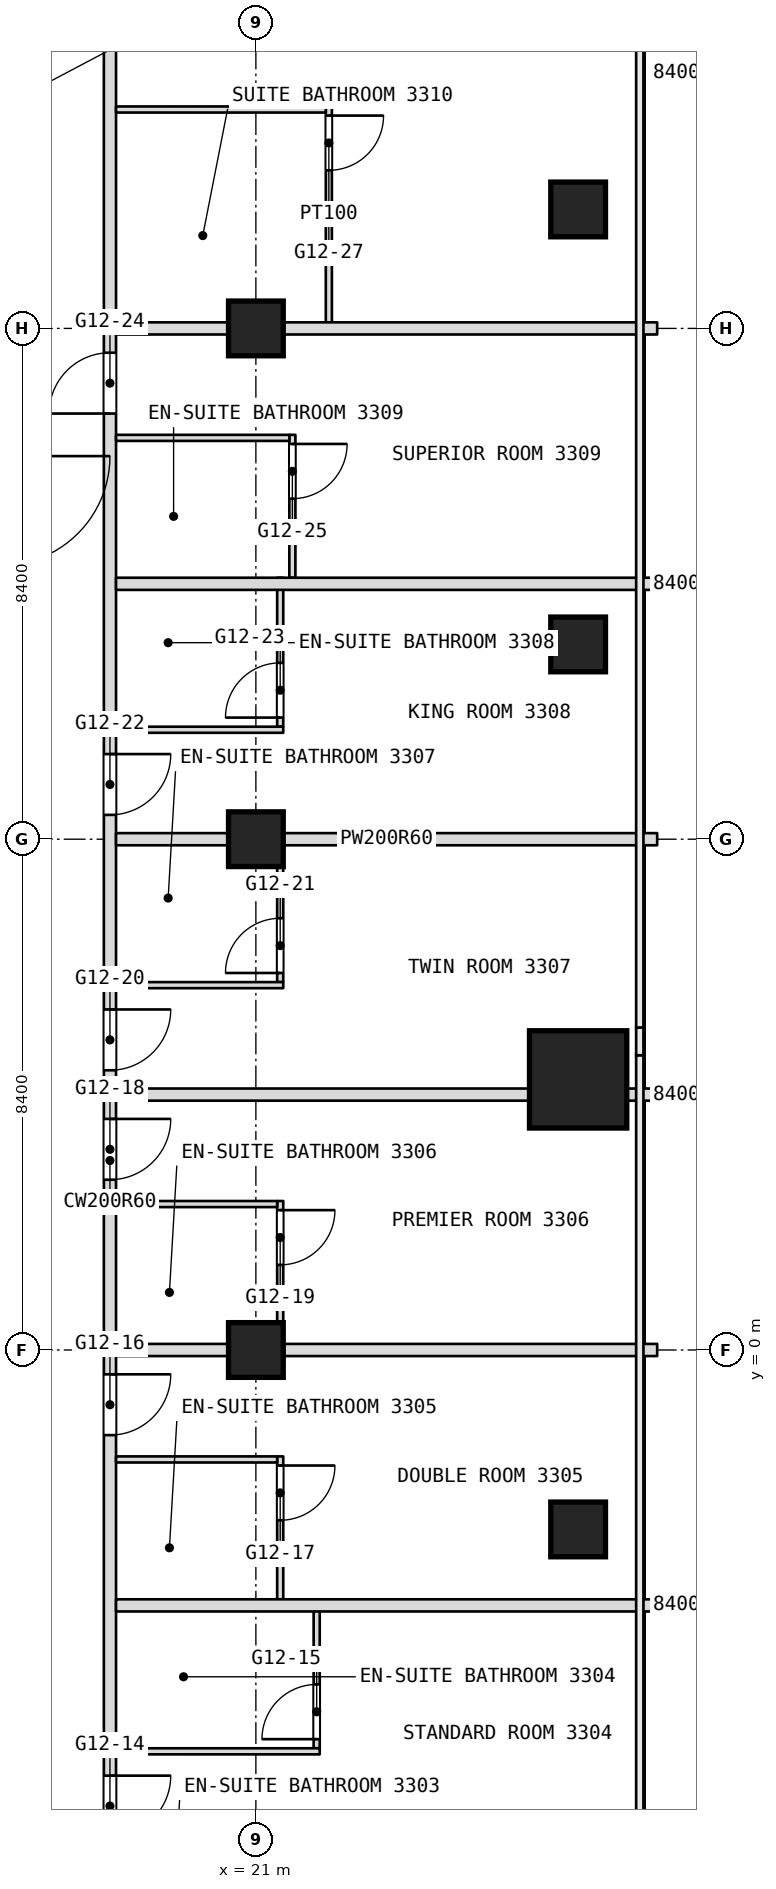
"""IFC4 building model, lengths in metres.
Left out: names, types, materials, properties, quantities, classifications, styles, units other than length and angle.
Written with IfcOpenShell. Run it as: python <this file> out.ifc"""

import sys

from ifc_helpers import new_model, si_unit, direction, frame, frame_2d, origin, origin_2d, place, context, subcontext, project, spatial, rectangle, extrude, element, fill, save


model = new_model("IFC4")
c1 = context("Model", 3, precision=1e-05, world=origin(), true_north=direction((0.0, 1.0)))
c2 = subcontext(c1, "Body", "Model", "MODEL_VIEW")
j1 = project(units=[si_unit("LENGTHUNIT", "METRE"), si_unit("PLANEANGLEUNIT", "RADIAN")], contexts=[c1])
p1 = place(None, origin())
s1 = spatial("IfcSite", under=j1, at=p1, CompositionType="ELEMENT")
p2 = place(p1, origin())
s2 = spatial("IfcBuilding", under=s1, at=p2, CompositionType="ELEMENT")
p3 = place(p2, frame((0.0, 0.0, 144.5)))
s3 = spatial("IfcBuildingStorey", under=s2, at=p3, CompositionType="ELEMENT", Elevation=144.5)
p4 = place(p3, frame((26.3, 4.45, 0.0), z_axis=(0.0, 0.0, 1.0), x_axis=(1.0, 0.0, 0.0)))
e1 = element("IfcColumn", 1, at=p4, inside=s3, PredefinedType="COLUMN", context=c2, shape_type="SweptSolid", body=[
    extrude(rectangle(XDim=1.6, YDim=1.6, at=origin_2d()), origin(), (0.0, 0.0, 1.0), 3.6),
])
for number, where, z_axis, x_axis in (
    (2, (21.0, 0.0, 0.0), (0.0, 0.0, 1.0), (1.0, 0.0, 0.0)),
    (3, (21.0, 8.4, 0.0), (0.0, 0.0, 1.0), (1.0, 0.0, 0.0)),
    (4, (21.0, 16.8, 0.0), (0.0, 0.0, 1.0), (1.0, 0.0, 0.0)),
    (5, (26.3, 18.756, 0.0), (0.0, 0.0, 1.0), (1.0, 0.0, 0.0)),
    (6, (26.3, 11.603, 0.0), (0.0, 0.0, 1.0), (1.0, 0.0, 0.0)),
    (7, (26.3, -2.951, 0.0), (0.0, 0.0, 1.0), (1.0, 0.0, 0.0)),
):
    element("IfcColumn", number, at=place(p3, frame(where, z_axis=z_axis, x_axis=x_axis)), inside=s3, PredefinedType="COLUMN", context=c2, shape_type="SweptSolid", body=[
        extrude(rectangle(XDim=0.9, YDim=0.9, at=origin_2d()), origin(), (0.0, 0.0, 1.0), 3.6),
    ])
p5 = place(p3, frame((22.2, 16.9, 0.0), z_axis=(0.0, 0.0, 1.0), x_axis=(0.0, 1.0, 0.0)))
e8 = element("IfcWall", 8, at=p5, inside=s3, PredefinedType="PARTITIONING", context=c2, shape_type="SweptSolid", body=[
    extrude(rectangle(XDim=3.55, YDim=0.1, at=frame_2d((1.775, 0.0))), origin(), (0.0, 0.0, 1.0), 3.34),
])
p6 = place(p5, frame((2.5, 0.0, 0.0)))
e9 = element("IfcOpeningElement", 9, at=p6, cuts=e8, PredefinedType="OPENING", context=c2, shape_type="SweptSolid", body=[
    extrude(rectangle(XDim=0.9, YDim=2.1, at=frame_2d((0.45, 1.05))), frame((0.0, 0.05, 0.0), z_axis=(0.0, -1.0, 0.0), x_axis=(1.0, 0.0, 0.0)), (0.0, 0.0, 1.0), 0.1),
])
p7 = place(p3, frame((22.0, -6.55, 0.0), z_axis=(0.0, 0.0, 1.0), x_axis=(0.0, 1.0, 0.0)))
e10 = element("IfcWall", 10, at=p7, inside=s3, PredefinedType="PARTITIONING", context=c2, shape_type="SweptSolid", body=[
    extrude(rectangle(XDim=2.45, YDim=0.1, at=frame_2d((1.225, 0.0))), origin(), (0.0, 0.0, 1.0), 3.34),
])
p8 = place(p7, frame((0.15, 0.0, 0.0)))
e11 = element("IfcOpeningElement", 11, at=p8, cuts=e10, PredefinedType="OPENING", context=c2, shape_type="SweptSolid", body=[
    extrude(rectangle(XDim=0.9, YDim=2.1, at=frame_2d((0.45, 1.05))), frame((0.0, 0.05, 0.0), z_axis=(0.0, -1.0, 0.0), x_axis=(1.0, 0.0, 0.0)), (0.0, 0.0, 1.0), 0.1),
])
p9 = place(p3, frame((21.6, 12.7, 0.0), z_axis=(0.0, 0.0, 1.0), x_axis=(0.0, 1.0, 0.0)))
e12 = element("IfcWall", 12, at=p9, inside=s3, PredefinedType="PARTITIONING", context=c2, shape_type="SweptSolid", body=[
    extrude(rectangle(XDim=2.35, YDim=0.1, at=frame_2d((1.175, 0.0))), origin(), (0.0, 0.0, 1.0), 3.34),
])
p10 = place(p9, frame((1.3, 0.0, 0.0)))
e13 = element("IfcOpeningElement", 13, at=p10, cuts=e12, PredefinedType="OPENING", context=c2, shape_type="SweptSolid", body=[
    extrude(rectangle(XDim=0.9, YDim=2.1, at=frame_2d((0.45, 1.05))), frame((0.0, 0.05, 0.0), z_axis=(0.0, -1.0, 0.0), x_axis=(1.0, 0.0, 0.0)), (0.0, 0.0, 1.0), 0.1),
])
p11 = place(p3, frame((21.4, -4.1, 0.0), z_axis=(0.0, 0.0, 1.0), x_axis=(0.0, 1.0, 0.0)))
e14 = element("IfcWall", 14, at=p11, inside=s3, PredefinedType="PARTITIONING", context=c2, shape_type="SweptSolid", body=[
    extrude(rectangle(XDim=2.35, YDim=0.1, at=frame_2d((1.175, 0.0))), origin(), (0.0, 0.0, 1.0), 3.34),
])
p12 = place(p11, frame((1.3, 0.0, 0.0)))
e15 = element("IfcOpeningElement", 15, at=p12, cuts=e14, PredefinedType="OPENING", context=c2, shape_type="SweptSolid", body=[
    extrude(rectangle(XDim=0.9, YDim=2.1, at=frame_2d((0.45, 1.05))), frame((0.0, 0.05, 0.0), z_axis=(0.0, -1.0, 0.0), x_axis=(1.0, 0.0, 0.0)), (0.0, 0.0, 1.0), 0.1),
])
p13 = place(p3, frame((21.4, 0.1, 0.0), z_axis=(0.0, 0.0, 1.0), x_axis=(0.0, 1.0, 0.0)))
e16 = element("IfcWall", 16, at=p13, inside=s3, PredefinedType="PARTITIONING", context=c2, shape_type="SweptSolid", body=[
    extrude(rectangle(XDim=2.35, YDim=0.1, at=frame_2d((1.175, 0.0))), origin(), (0.0, 0.0, 1.0), 3.34),
])
p14 = place(p13, frame((1.3, 0.0, 0.0)))
e17 = element("IfcOpeningElement", 17, at=p14, cuts=e16, PredefinedType="OPENING", context=c2, shape_type="SweptSolid", body=[
    extrude(rectangle(XDim=0.9, YDim=2.1, at=frame_2d((0.45, 1.05))), frame((0.0, 0.05, 0.0), z_axis=(0.0, -1.0, 0.0), x_axis=(1.0, 0.0, 0.0)), (0.0, 0.0, 1.0), 0.1),
])
p15 = place(p3, frame((21.4, 6.05, 0.0), z_axis=(0.0, 0.0, 1.0), x_axis=(0.0, 1.0, 0.0)))
e18 = element("IfcWall", 18, at=p15, inside=s3, PredefinedType="PARTITIONING", context=c2, shape_type="SweptSolid", body=[
    extrude(rectangle(XDim=2.45, YDim=0.1, at=frame_2d((1.225, 0.0))), origin(), (0.0, 0.0, 1.0), 3.34),
])
p16 = place(p15, frame((0.15, 0.0, 0.0)))
e19 = element("IfcOpeningElement", 19, at=p16, cuts=e18, PredefinedType="OPENING", context=c2, shape_type="SweptSolid", body=[
    extrude(rectangle(XDim=0.9, YDim=2.1, at=frame_2d((0.45, 1.05))), frame((0.0, 0.05, 0.0), z_axis=(0.0, -1.0, 0.0), x_axis=(1.0, 0.0, 0.0)), (0.0, 0.0, 1.0), 0.1),
])
p17 = place(p3, frame((21.4, 10.25, 0.0), z_axis=(0.0, 0.0, 1.0), x_axis=(0.0, 1.0, 0.0)))
e20 = element("IfcWall", 20, at=p17, inside=s3, PredefinedType="PARTITIONING", context=c2, shape_type="SweptSolid", body=[
    extrude(rectangle(XDim=2.45, YDim=0.1, at=frame_2d((1.225, 0.0))), origin(), (0.0, 0.0, 1.0), 3.34),
])
p18 = place(p17, frame((0.15, 0.0, 0.0)))
e21 = element("IfcOpeningElement", 21, at=p18, cuts=e20, PredefinedType="OPENING", context=c2, shape_type="SweptSolid", body=[
    extrude(rectangle(XDim=0.9, YDim=2.1, at=frame_2d((0.45, 1.05))), frame((0.0, 0.05, 0.0), z_axis=(0.0, -1.0, 0.0), x_axis=(1.0, 0.0, 0.0)), (0.0, 0.0, 1.0), 0.1),
])
p19 = place(p3, frame((18.6, -21.708, 0.0), z_axis=(0.0, 0.0, 1.0), x_axis=(0.0, 1.0, 0.0)))
e22 = element("IfcWall", 22, at=p19, inside=s3, PredefinedType="PARTITIONING", context=c2, shape_type="SweptSolid", body=[
    extrude(rectangle(XDim=49.648, YDim=0.2, at=frame_2d((24.824, 0.0))), origin(), (0.0, 0.0, 1.0), 3.34),
])
p20 = place(p19, frame((2.8, 0.0, 0.0)))
e23 = element("IfcOpeningElement", 23, at=p20, cuts=e22, PredefinedType="OPENING", context=c2, shape_type="SweptSolid", body=[
    extrude(rectangle(XDim=1.0, YDim=2.1, at=frame_2d((0.5, 1.05))), frame((0.0, 0.1, 0.0), z_axis=(0.0, -1.0, 0.0), x_axis=(1.0, 0.0, 0.0)), (0.0, 0.0, 1.0), 0.2),
])
p21 = place(p19, frame((7.708, 0.0, 0.0)))
e24 = element("IfcOpeningElement", 24, at=p21, cuts=e22, PredefinedType="OPENING", context=c2, shape_type="SweptSolid", body=[
    extrude(rectangle(XDim=1.0, YDim=2.1, at=frame_2d((0.5, 1.05))), frame((0.0, 0.1, 0.0), z_axis=(0.0, -1.0, 0.0), x_axis=(1.0, 0.0, 0.0)), (0.0, 0.0, 1.0), 0.2),
])
p22 = place(p19, frame((9.508, 0.0, 0.0)))
e25 = element("IfcOpeningElement", 25, at=p22, cuts=e22, PredefinedType="OPENING", context=c2, shape_type="SweptSolid", body=[
    extrude(rectangle(XDim=1.0, YDim=2.1, at=frame_2d((0.5, 1.05))), frame((0.0, 0.1, 0.0), z_axis=(0.0, -1.0, 0.0), x_axis=(1.0, 0.0, 0.0)), (0.0, 0.0, 1.0), 0.2),
])
p23 = place(p19, frame((13.708, 0.0, 0.0)))
e26 = element("IfcOpeningElement", 26, at=p23, cuts=e22, PredefinedType="OPENING", context=c2, shape_type="SweptSolid", body=[
    extrude(rectangle(XDim=1.0, YDim=2.1, at=frame_2d((0.5, 1.05))), frame((0.0, 0.1, 0.0), z_axis=(0.0, -1.0, 0.0), x_axis=(1.0, 0.0, 0.0)), (0.0, 0.0, 1.0), 0.2),
])
p24 = place(p19, frame((20.308, 0.0, 0.0)))
e27 = element("IfcOpeningElement", 27, at=p24, cuts=e22, PredefinedType="OPENING", context=c2, shape_type="SweptSolid", body=[
    extrude(rectangle(XDim=1.0, YDim=2.1, at=frame_2d((0.5, 1.05))), frame((0.0, 0.1, 0.0), z_axis=(0.0, -1.0, 0.0), x_axis=(1.0, 0.0, 0.0)), (0.0, 0.0, 1.0), 0.2),
])
p25 = place(p19, frame((24.508, 0.0, 0.0)))
e28 = element("IfcOpeningElement", 28, at=p25, cuts=e22, PredefinedType="OPENING", context=c2, shape_type="SweptSolid", body=[
    extrude(rectangle(XDim=1.0, YDim=2.1, at=frame_2d((0.5, 1.05))), frame((0.0, 0.1, 0.0), z_axis=(0.0, -1.0, 0.0), x_axis=(1.0, 0.0, 0.0)), (0.0, 0.0, 1.0), 0.2),
])
p26 = place(p19, frame((26.308, 0.0, 0.0)))
e29 = element("IfcOpeningElement", 29, at=p26, cuts=e22, PredefinedType="OPENING", context=c2, shape_type="SweptSolid", body=[
    extrude(rectangle(XDim=1.0, YDim=2.1, at=frame_2d((0.5, 1.05))), frame((0.0, 0.1, 0.0), z_axis=(0.0, -1.0, 0.0), x_axis=(1.0, 0.0, 0.0)), (0.0, 0.0, 1.0), 0.2),
])
p27 = place(p19, frame((30.508, 0.0, 0.0)))
e30 = element("IfcOpeningElement", 30, at=p27, cuts=e22, PredefinedType="OPENING", context=c2, shape_type="SweptSolid", body=[
    extrude(rectangle(XDim=1.0, YDim=2.1, at=frame_2d((0.5, 1.05))), frame((0.0, 0.1, 0.0), z_axis=(0.0, -1.0, 0.0), x_axis=(1.0, 0.0, 0.0)), (0.0, 0.0, 1.0), 0.2),
])
p28 = place(p19, frame((37.108, 0.0, 0.0)))
e31 = element("IfcOpeningElement", 31, at=p28, cuts=e22, PredefinedType="OPENING", context=c2, shape_type="SweptSolid", body=[
    extrude(rectangle(XDim=1.0, YDim=2.1, at=frame_2d((0.5, 1.05))), frame((0.0, 0.1, 0.0), z_axis=(0.0, -1.0, 0.0), x_axis=(1.0, 0.0, 0.0)), (0.0, 0.0, 1.0), 0.2),
])
p29 = place(p19, frame((43.558, 0.0, 0.0)))
e32 = element("IfcOpeningElement", 32, at=p29, cuts=e22, PredefinedType="OPENING", context=c2, shape_type="SweptSolid", body=[
    extrude(rectangle(XDim=1.1, YDim=2.1, at=frame_2d((0.55, 1.05))), frame((0.0, 0.1, 0.0), z_axis=(0.0, -1.0, 0.0), x_axis=(1.0, 0.0, 0.0)), (0.0, 0.0, 1.0), 0.2),
])
p30 = place(p3, frame((18.7, -6.6, 0.0), z_axis=(0.0, 0.0, 1.0), x_axis=(1.0, 0.0, 0.0)))
e33 = element("IfcWall", 33, at=p30, inside=s3, PredefinedType="PARTITIONING", context=c2, shape_type="SweptSolid", body=[
    extrude(rectangle(XDim=3.35, YDim=0.1, at=frame_2d((1.675, 0.0))), origin(), (0.0, 0.0, 1.0), 3.34),
])
p31 = place(p3, frame((18.7, -4.2, 0.0), z_axis=(0.0, 0.0, 1.0), x_axis=(1.0, 0.0, 0.0)))
e34 = element("IfcWall", 34, at=p31, inside=s3, PredefinedType="PARTITIONING", context=c2, shape_type="SweptSolid", body=[
    extrude(rectangle(XDim=8.9, YDim=0.2, at=frame_2d((4.45, 0.0))), origin(), (0.0, 0.0, 1.0), 3.34),
])
p32 = place(p3, frame((18.7, -1.8, 0.0), z_axis=(0.0, 0.0, 1.0), x_axis=(1.0, 0.0, 0.0)))
e35 = element("IfcWall", 35, at=p32, inside=s3, PredefinedType="PARTITIONING", context=c2, shape_type="SweptSolid", body=[
    extrude(rectangle(XDim=2.65, YDim=0.1, at=frame_2d((1.325, 0.0))), origin(), (0.0, 0.0, 1.0), 3.34),
])
p33 = place(p3, frame((18.7, 0.0, 0.0), z_axis=(0.0, 0.0, 1.0), x_axis=(1.0, 0.0, 0.0)))
e36 = element("IfcWall", 36, at=p33, inside=s3, PredefinedType="PARTITIONING", context=c2, shape_type="SweptSolid", body=[
    extrude(rectangle(XDim=8.9, YDim=0.2, at=frame_2d((4.45, 0.0))), origin(), (0.0, 0.0, 1.0), 2.89),
])
p34 = place(p3, frame((18.7, 2.4, 0.0), z_axis=(0.0, 0.0, 1.0), x_axis=(1.0, 0.0, 0.0)))
e37 = element("IfcWall", 37, at=p34, inside=s3, PredefinedType="PARTITIONING", context=c2, shape_type="SweptSolid", body=[
    extrude(rectangle(XDim=2.65, YDim=0.1, at=frame_2d((1.325, 0.0))), origin(), (0.0, 0.0, 1.0), 3.34),
])
p35 = place(p3, frame((18.7, 4.2, 0.0), z_axis=(0.0, 0.0, 1.0), x_axis=(1.0, 0.0, 0.0)))
e38 = element("IfcWall", 38, at=p35, inside=s3, PredefinedType="PARTITIONING", context=c2, shape_type="SweptSolid", body=[
    extrude(rectangle(XDim=6.8, YDim=0.2, at=frame_2d((3.4, 0.0))), origin(), (0.0, 0.0, 1.0), 3.34),
])
p36 = place(p3, frame((27.1, 4.2, 0.0), z_axis=(0.0, 0.0, 1.0), x_axis=(1.0, 0.0, 0.0)))
e39 = element("IfcWall", 39, at=p36, inside=s3, PredefinedType="PARTITIONING", context=c2, shape_type="SweptSolid", body=[
    extrude(rectangle(XDim=0.5, YDim=0.2, at=frame_2d((0.25, 0.0))), origin(), (0.0, 0.0, 1.0), 3.34),
])
p37 = place(p3, frame((18.7, 6.0, 0.0), z_axis=(0.0, 0.0, 1.0), x_axis=(1.0, 0.0, 0.0)))
e40 = element("IfcWall", 40, at=p37, inside=s3, PredefinedType="PARTITIONING", context=c2, shape_type="SweptSolid", body=[
    extrude(rectangle(XDim=2.75, YDim=0.1, at=frame_2d((1.375, 0.0))), origin(), (0.0, 0.0, 1.0), 3.34),
])
p38 = place(p3, frame((18.7, 8.4, 0.0), z_axis=(0.0, 0.0, 1.0), x_axis=(1.0, 0.0, 0.0)))
e41 = element("IfcWall", 41, at=p38, inside=s3, PredefinedType="PARTITIONING", context=c2, shape_type="SweptSolid", body=[
    extrude(rectangle(XDim=8.9, YDim=0.2, at=frame_2d((4.45, 0.0))), origin(), (0.0, 0.0, 1.0), 2.89),
])
p39 = place(p3, frame((18.7, 10.2, 0.0), z_axis=(0.0, 0.0, 1.0), x_axis=(1.0, 0.0, 0.0)))
e42 = element("IfcWall", 42, at=p39, inside=s3, PredefinedType="PARTITIONING", context=c2, shape_type="SweptSolid", body=[
    extrude(rectangle(XDim=2.75, YDim=0.1, at=frame_2d((1.375, 0.0))), origin(), (0.0, 0.0, 1.0), 3.34),
])
p40 = place(p3, frame((18.7, 12.6, 0.0), z_axis=(0.0, 0.0, 1.0), x_axis=(1.0, 0.0, 0.0)))
e43 = element("IfcWall", 43, at=p40, inside=s3, PredefinedType="PARTITIONING", context=c2, shape_type="SweptSolid", body=[
    extrude(rectangle(XDim=8.9, YDim=0.2, at=frame_2d((4.45, 0.0))), origin(), (0.0, 0.0, 1.0), 3.34),
])
p41 = place(p3, frame((18.7, 15.0, 0.0), z_axis=(0.0, 0.0, 1.0), x_axis=(1.0, 0.0, 0.0)))
e44 = element("IfcWall", 44, at=p41, inside=s3, PredefinedType="PARTITIONING", context=c2, shape_type="SweptSolid", body=[
    extrude(rectangle(XDim=2.85, YDim=0.1, at=frame_2d((1.425, 0.0))), origin(), (0.0, 0.0, 1.0), 3.34),
])
p42 = place(p3, frame((18.7, 16.8, 0.0), z_axis=(0.0, 0.0, 1.0), x_axis=(1.0, 0.0, 0.0)))
e45 = element("IfcWall", 45, at=p42, inside=s3, PredefinedType="PARTITIONING", context=c2, shape_type="SweptSolid", body=[
    extrude(rectangle(XDim=8.9, YDim=0.2, at=frame_2d((4.45, 0.0))), origin(), (0.0, 0.0, 1.0), 2.89),
])
p43 = place(p3, frame((18.7, 20.4, 0.0), z_axis=(0.0, 0.0, 1.0), x_axis=(1.0, 0.0, 0.0)))
e46 = element("IfcWall", 46, at=p43, inside=s3, PredefinedType="PARTITIONING", context=c2, shape_type="SweptSolid", body=[
    extrude(rectangle(XDim=3.45, YDim=0.1, at=frame_2d((1.725, 0.0))), origin(), (0.0, 0.0, 1.0), 3.34),
])
p44 = place(p6, origin())
e47 = element("IfcDoor", 47, at=p44, inside=s3, OperationType="SINGLE_SWING_RIGHT", PredefinedType="DOOR", context=c2, shape_type="SweptSolid", body=[
    extrude(rectangle(XDim=0.9, YDim=2.1, at=frame_2d((0.45, 1.05))), frame((0.0, 0.025, 0.0), z_axis=(0.0, -1.0, 0.0), x_axis=(1.0, 0.0, 0.0)), (0.0, 0.0, 1.0), 0.05),
])
fill(e9, e47)
p45 = place(p8, origin())
e48 = element("IfcDoor", 48, at=p45, inside=s3, OperationType="SINGLE_SWING_LEFT", PredefinedType="DOOR", context=c2, shape_type="SweptSolid", body=[
    extrude(rectangle(XDim=0.9, YDim=2.1, at=frame_2d((0.45, 1.05))), frame((0.0, 0.025, 0.0), z_axis=(0.0, -1.0, 0.0), x_axis=(1.0, 0.0, 0.0)), (0.0, 0.0, 1.0), 0.05),
])
fill(e11, e48)
p46 = place(p10, origin())
e49 = element("IfcDoor", 49, at=p46, inside=s3, OperationType="SINGLE_SWING_RIGHT", PredefinedType="DOOR", context=c2, shape_type="SweptSolid", body=[
    extrude(rectangle(XDim=0.9, YDim=2.1, at=frame_2d((0.45, 1.05))), frame((0.0, 0.025, 0.0), z_axis=(0.0, -1.0, 0.0), x_axis=(1.0, 0.0, 0.0)), (0.0, 0.0, 1.0), 0.05),
])
fill(e13, e49)
p47 = place(p12, origin())
e50 = element("IfcDoor", 50, at=p47, inside=s3, OperationType="SINGLE_SWING_RIGHT", PredefinedType="DOOR", context=c2, shape_type="SweptSolid", body=[
    extrude(rectangle(XDim=0.9, YDim=2.1, at=frame_2d((0.45, 1.05))), frame((0.0, 0.025, 0.0), z_axis=(0.0, -1.0, 0.0), x_axis=(1.0, 0.0, 0.0)), (0.0, 0.0, 1.0), 0.05),
])
fill(e15, e50)
p48 = place(p14, origin())
e51 = element("IfcDoor", 51, at=p48, inside=s3, OperationType="SINGLE_SWING_RIGHT", PredefinedType="DOOR", context=c2, shape_type="SweptSolid", body=[
    extrude(rectangle(XDim=0.9, YDim=2.1, at=frame_2d((0.45, 1.05))), frame((0.0, 0.025, 0.0), z_axis=(0.0, -1.0, 0.0), x_axis=(1.0, 0.0, 0.0)), (0.0, 0.0, 1.0), 0.05),
])
fill(e17, e51)
p49 = place(p16, origin())
e52 = element("IfcDoor", 52, at=p49, inside=s3, OperationType="SINGLE_SWING_LEFT", PredefinedType="DOOR", context=c2, shape_type="SweptSolid", body=[
    extrude(rectangle(XDim=0.9, YDim=2.1, at=frame_2d((0.45, 1.05))), frame((0.0, 0.025, 0.0), z_axis=(0.0, -1.0, 0.0), x_axis=(1.0, 0.0, 0.0)), (0.0, 0.0, 1.0), 0.05),
])
fill(e19, e52)
p50 = place(p18, origin())
e53 = element("IfcDoor", 53, at=p50, inside=s3, OperationType="SINGLE_SWING_LEFT", PredefinedType="DOOR", context=c2, shape_type="SweptSolid", body=[
    extrude(rectangle(XDim=0.9, YDim=2.1, at=frame_2d((0.45, 1.05))), frame((0.0, 0.025, 0.0), z_axis=(0.0, -1.0, 0.0), x_axis=(1.0, 0.0, 0.0)), (0.0, 0.0, 1.0), 0.05),
])
fill(e21, e53)
p51 = place(p23, origin())
e54 = element("IfcDoor", 54, at=p51, inside=s3, OperationType="SINGLE_SWING_RIGHT", PredefinedType="DOOR", context=c2, shape_type="SweptSolid", body=[
    extrude(rectangle(XDim=1.0, YDim=2.1, at=frame_2d((0.5, 1.05))), frame((0.0, 0.025, 0.0), z_axis=(0.0, -1.0, 0.0), x_axis=(1.0, 0.0, 0.0)), (0.0, 0.0, 1.0), 0.05),
])
fill(e26, e54)
p52 = place(p24, origin())
e55 = element("IfcDoor", 55, at=p52, inside=s3, OperationType="SINGLE_SWING_RIGHT", PredefinedType="DOOR", context=c2, shape_type="SweptSolid", body=[
    extrude(rectangle(XDim=1.0, YDim=2.1, at=frame_2d((0.5, 1.05))), frame((0.0, 0.025, 0.0), z_axis=(0.0, -1.0, 0.0), x_axis=(1.0, 0.0, 0.0)), (0.0, 0.0, 1.0), 0.05),
])
fill(e27, e55)
p53 = place(p25, origin())
e56 = element("IfcDoor", 56, at=p53, inside=s3, OperationType="SINGLE_SWING_RIGHT", PredefinedType="DOOR", context=c2, shape_type="SweptSolid", body=[
    extrude(rectangle(XDim=1.0, YDim=2.1, at=frame_2d((0.5, 1.05))), frame((0.0, 0.025, 0.0), z_axis=(0.0, -1.0, 0.0), x_axis=(1.0, 0.0, 0.0)), (0.0, 0.0, 1.0), 0.05),
])
fill(e28, e56)
p54 = place(p26, origin())
e57 = element("IfcDoor", 57, at=p54, inside=s3, OperationType="SINGLE_SWING_RIGHT", PredefinedType="DOOR", context=c2, shape_type="SweptSolid", body=[
    extrude(rectangle(XDim=1.0, YDim=2.1, at=frame_2d((0.5, 1.05))), frame((0.0, 0.025, 0.0), z_axis=(0.0, -1.0, 0.0), x_axis=(1.0, 0.0, 0.0)), (0.0, 0.0, 1.0), 0.05),
])
fill(e29, e57)
p55 = place(p27, origin())
e58 = element("IfcDoor", 58, at=p55, inside=s3, OperationType="SINGLE_SWING_RIGHT", PredefinedType="DOOR", context=c2, shape_type="SweptSolid", body=[
    extrude(rectangle(XDim=1.0, YDim=2.1, at=frame_2d((0.5, 1.05))), frame((0.0, 0.025, 0.0), z_axis=(0.0, -1.0, 0.0), x_axis=(1.0, 0.0, 0.0)), (0.0, 0.0, 1.0), 0.05),
])
fill(e30, e58)
p56 = place(p28, origin())
e59 = element("IfcDoor", 59, at=p56, inside=s3, OperationType="SINGLE_SWING_RIGHT", PredefinedType="DOOR", context=c2, shape_type="SweptSolid", body=[
    extrude(rectangle(XDim=1.0, YDim=2.1, at=frame_2d((0.5, 1.05))), frame((0.0, 0.025, 0.0), z_axis=(0.0, -1.0, 0.0), x_axis=(1.0, 0.0, 0.0)), (0.0, 0.0, 1.0), 0.05),
])
fill(e31, e59)
save(model, sys.argv[1])
